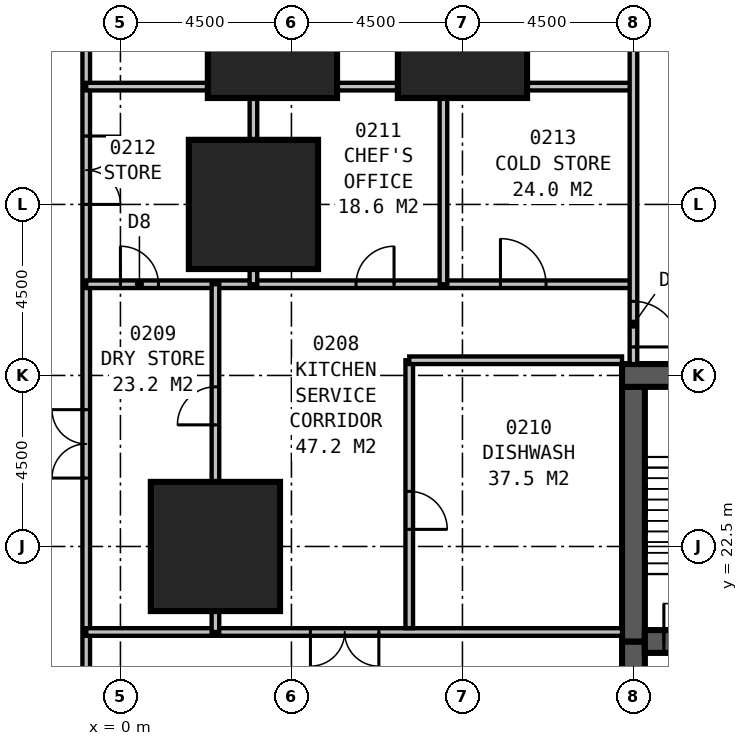
"""IFC4 building model, lengths in metres.
Left out: names, types, materials, properties, quantities, classifications, styles, units other than length and angle.
Written with IfcOpenShell. Run it as: python <this file> out.ifc"""

import sys

from ifc_helpers import new_model, si_unit, direction, frame, frame_2d, origin, origin_2d, place, context, subcontext, project, spatial, rectangle, extrude, element, fill, save


model = new_model("IFC4")
c1 = context("Model", 3, precision=1e-05, world=origin(), true_north=direction((0.0, 1.0)))
c2 = subcontext(c1, "Body", "Model", "MODEL_VIEW")
j1 = project(units=[si_unit("LENGTHUNIT", "METRE"), si_unit("PLANEANGLEUNIT", "RADIAN")], contexts=[c1])
p1 = place(None, origin())
s1 = spatial("IfcSite", under=j1, at=p1, CompositionType="ELEMENT")
p2 = place(p1, origin())
s2 = spatial("IfcBuilding", under=s1, at=p2, CompositionType="ELEMENT")
p3 = place(p2, frame((0.0, 0.0, 11.0)))
s3 = spatial("IfcBuildingStorey", under=s2, at=p3, CompositionType="ELEMENT", Elevation=11.0)
for number, where, z_axis, x_axis in (
    (1, (9.0, 36.0, 0.0), (0.0, 0.0, 1.0), (1.0, 0.0, 0.0)),
    (2, (4.0, 36.0, 0.0), (0.0, 0.0, 1.0), (1.0, 0.0, 0.0)),
    (3, (3.5, 31.5, 0.0), (0.0, 0.0, 1.0), (1.0, 0.0, 0.0)),
    (4, (2.5, 22.5, 0.0), (0.0, 0.0, 1.0), (1.0, 0.0, 0.0)),
):
    element("IfcColumn", number, at=place(p3, frame(where, z_axis=z_axis, x_axis=x_axis)), inside=s3, PredefinedType="COLUMN", context=c2, shape_type="SweptSolid", body=[
        extrude(rectangle(XDim=3.4, YDim=3.4, at=origin_2d()), origin(), (0.0, 0.0, 1.0), 8.0),
    ])
p4 = place(p3, frame((36.3, 27.0, 0.0), z_axis=(0.0, 0.0, 1.0), x_axis=(-1.0, 0.0, 0.0)))
e5 = element("IfcWall", 5, at=p4, inside=s3, PredefinedType="SHEAR", context=c2, shape_type="SweptSolid", body=[
    extrude(rectangle(XDim=23.1, YDim=0.6, at=frame_2d((11.55, 0.0))), origin(), (0.0, 0.0, 1.0), 8.0),
])
p5 = place(p4, frame((17.05, 0.0, 0.0)))
e6 = element("IfcOpeningElement", 6, at=p5, cuts=e5, PredefinedType="OPENING", context=c2, shape_type="SweptSolid", body=[
    extrude(rectangle(XDim=1.0, YDim=2.1, at=frame_2d((0.5, 1.05))), frame((0.0, 0.31, 0.0), z_axis=(0.0, -1.0, 0.0), x_axis=(1.0, 0.0, 0.0)), (0.0, 0.0, 1.0), 0.62),
])
p6 = place(p4, frame((12.05, 0.0, 0.0)))
e7 = element("IfcOpeningElement", 7, at=p6, cuts=e5, PredefinedType="OPENING", context=c2, shape_type="SweptSolid", body=[
    extrude(rectangle(XDim=1.0, YDim=2.1, at=frame_2d((0.5, 1.05))), frame((0.0, 0.31, 0.0), z_axis=(0.0, -1.0, 0.0), x_axis=(1.0, 0.0, 0.0)), (0.0, 0.0, 1.0), 0.62),
])
p7 = place(p4, frame((7.05, 0.0, 0.0)))
e8 = element("IfcOpeningElement", 8, at=p7, cuts=e5, PredefinedType="OPENING", context=c2, shape_type="SweptSolid", body=[
    extrude(rectangle(XDim=1.0, YDim=2.1, at=frame_2d((0.5, 1.05))), frame((0.0, 0.31, 0.0), z_axis=(0.0, -1.0, 0.0), x_axis=(1.0, 0.0, 0.0)), (0.0, 0.0, 1.0), 0.62),
])
p8 = place(p3, frame((13.8, 20.0, 0.0), z_axis=(0.0, 0.0, 1.0), x_axis=(1.0, 0.0, 0.0)))
e9 = element("IfcWall", 9, at=p8, inside=s3, PredefinedType="SHEAR", context=c2, shape_type="SweptSolid", body=[
    extrude(rectangle(XDim=21.9, YDim=0.6, at=frame_2d((10.95, 0.0))), origin(), (0.0, 0.0, 1.0), 8.0),
])
p9 = place(p8, frame((0.5, 0.0, 0.0)))
e10 = element("IfcOpeningElement", 10, at=p9, cuts=e9, PredefinedType="OPENING", context=c2, shape_type="SweptSolid", body=[
    extrude(rectangle(XDim=1.0, YDim=2.1, at=frame_2d((0.5, 1.05))), frame((0.0, 0.31, 0.0), z_axis=(0.0, -1.0, 0.0), x_axis=(1.0, 0.0, 0.0)), (0.0, 0.0, 1.0), 0.62),
])
p10 = place(p8, frame((20.5, 0.0, 0.0)))
e11 = element("IfcOpeningElement", 11, at=p10, cuts=e9, PredefinedType="OPENING", context=c2, shape_type="SweptSolid", body=[
    extrude(rectangle(XDim=1.0, YDim=2.1, at=frame_2d((0.5, 1.05))), frame((0.0, 0.31, 0.0), z_axis=(0.0, -1.0, 0.0), x_axis=(1.0, 0.0, 0.0)), (0.0, 0.0, 1.0), 0.62),
])
p11 = place(p8, frame((16.65, 0.0, 0.0)))
e12 = element("IfcOpeningElement", 12, at=p11, cuts=e9, PredefinedType="OPENING", context=c2, shape_type="SweptSolid", body=[
    extrude(rectangle(XDim=1.1, YDim=2.1, at=frame_2d((0.55, 1.05))), frame((0.0, 0.31, 0.0), z_axis=(0.0, -1.0, 0.0), x_axis=(1.0, 0.0, 0.0)), (0.0, 0.0, 1.0), 0.62),
])
p12 = place(p3, frame((13.5, 26.7, 0.0), z_axis=(0.0, 0.0, 1.0), x_axis=(0.0, -1.0, 0.0)))
e13 = element("IfcWall", 13, at=p12, inside=s3, PredefinedType="SHEAR", context=c2, shape_type="SweptSolid", body=[
    extrude(rectangle(XDim=6.7, YDim=0.6, at=frame_2d((3.35, 0.0))), origin(), (0.0, 0.0, 1.0), 8.0),
])
p13 = place(p3, frame((13.5, 20.0, 0.0), z_axis=(0.0, 0.0, 1.0), x_axis=(0.0, -1.0, 0.0)))
e14 = element("IfcWall", 14, at=p13, inside=s3, PredefinedType="SHEAR", context=c2, shape_type="SweptSolid", body=[
    extrude(rectangle(XDim=3.5, YDim=0.6, at=frame_2d((1.75, 0.0))), origin(), (0.0, 0.0, 1.0), 8.0),
])
p14 = place(p13, frame((1.65, 0.0, 0.0)))
e15 = element("IfcOpeningElement", 15, at=p14, cuts=e14, PredefinedType="OPENING", context=c2, shape_type="SweptSolid", body=[
    extrude(rectangle(XDim=1.2, YDim=2.1, at=frame_2d((0.6, 1.05))), frame((0.0, 0.31, 0.0), z_axis=(0.0, -1.0, 0.0), x_axis=(1.0, 0.0, 0.0)), (0.0, 0.0, 1.0), 0.62),
])
p15 = place(p3, frame((-0.9, -4.5, 0.0), z_axis=(0.0, 0.0, 1.0), x_axis=(0.0, 1.0, 0.0)))
e16 = element("IfcWall", 16, at=p15, inside=s3, PredefinedType="PARTITIONING", context=c2, shape_type="SweptSolid", body=[
    extrude(rectangle(XDim=45.0, YDim=0.2, at=frame_2d((22.5, 0.0))), origin(), (0.0, 0.0, 1.0), 7.7),
])
p16 = place(p15, frame((7.2, 0.0, 0.0), z_axis=(0.0, 0.0, 1.0), x_axis=(-1.0, 0.0, 0.0)))
e17 = element("IfcOpeningElement", 17, at=p16, cuts=e16, PredefinedType="OPENING", context=c2, shape_type="SweptSolid", body=[
    extrude(rectangle(XDim=1.8, YDim=2.4, at=frame_2d((0.9, 1.2))), frame((0.0, 0.11, 0.0), z_axis=(0.0, -1.0, 0.0), x_axis=(1.0, 0.0, 0.0)), (0.0, 0.0, 1.0), 0.22),
])
p17 = place(p15, frame((21.6, 0.0, 0.0), z_axis=(0.0, 0.0, 1.0), x_axis=(-1.0, 0.0, 0.0)))
e18 = element("IfcOpeningElement", 18, at=p17, cuts=e16, PredefinedType="OPENING", context=c2, shape_type="SweptSolid", body=[
    extrude(rectangle(XDim=1.8, YDim=2.4, at=frame_2d((0.9, 1.2))), frame((0.0, 0.11, 0.0), z_axis=(0.0, -1.0, 0.0), x_axis=(1.0, 0.0, 0.0)), (0.0, 0.0, 1.0), 0.22),
])
p18 = place(p15, frame((28.8, 0.0, 0.0)))
e19 = element("IfcOpeningElement", 19, at=p18, cuts=e16, PredefinedType="OPENING", context=c2, shape_type="SweptSolid", body=[
    extrude(rectangle(XDim=1.8, YDim=2.4, at=frame_2d((0.9, 1.2))), frame((0.0, 0.11, 0.0), z_axis=(0.0, -1.0, 0.0), x_axis=(1.0, 0.0, 0.0)), (0.0, 0.0, 1.0), 0.22),
])
p19 = place(p15, frame((37.8, 0.0, 0.0), z_axis=(0.0, 0.0, 1.0), x_axis=(-1.0, 0.0, 0.0)))
e20 = element("IfcOpeningElement", 20, at=p19, cuts=e16, PredefinedType="OPENING", context=c2, shape_type="SweptSolid", body=[
    extrude(rectangle(XDim=1.8, YDim=2.4, at=frame_2d((0.9, 1.2))), frame((0.0, 0.11, 0.0), z_axis=(0.0, -1.0, 0.0), x_axis=(1.0, 0.0, 0.0)), (0.0, 0.0, 1.0), 0.22),
])
p20 = place(p3, frame((-0.9, 20.25, 0.0), z_axis=(0.0, 0.0, 1.0), x_axis=(1.0, 0.0, 0.0)))
e21 = element("IfcWall", 21, at=p20, inside=s3, PredefinedType="PARTITIONING", context=c2, shape_type="SweptSolid", body=[
    extrude(rectangle(XDim=14.1, YDim=0.2, at=frame_2d((7.05, 0.0))), origin(), (0.0, 0.0, 1.0), 7.7),
])
p21 = place(p20, frame((7.7, 0.0, 0.0), z_axis=(0.0, 0.0, 1.0), x_axis=(-1.0, 0.0, 0.0)))
e22 = element("IfcOpeningElement", 22, at=p21, cuts=e21, PredefinedType="OPENING", context=c2, shape_type="SweptSolid", body=[
    extrude(rectangle(XDim=1.8, YDim=2.4, at=frame_2d((0.9, 1.2))), frame((0.0, 0.11, 0.0), z_axis=(0.0, -1.0, 0.0), x_axis=(1.0, 0.0, 0.0)), (0.0, 0.0, 1.0), 0.22),
])
p22 = place(p3, frame((2.5, 20.25, 0.0), z_axis=(0.0, 0.0, 1.0), x_axis=(0.0, 1.0, 0.0)))
e23 = element("IfcWall", 23, at=p22, inside=s3, PredefinedType="PARTITIONING", context=c2, shape_type="SweptSolid", body=[
    extrude(rectangle(XDim=0.55, YDim=0.2, at=frame_2d((0.275, 0.0))), origin(), (0.0, 0.0, 1.0), 6.5),
])
p23 = place(p3, frame((2.5, 24.2, 0.0), z_axis=(0.0, 0.0, 1.0), x_axis=(0.0, 1.0, 0.0)))
e24 = element("IfcWall", 24, at=p23, inside=s3, PredefinedType="PARTITIONING", context=c2, shape_type="SweptSolid", body=[
    extrude(rectangle(XDim=5.2, YDim=0.2, at=frame_2d((2.6, 0.0))), origin(), (0.0, 0.0, 1.0), 6.5),
])
p24 = place(p23, frame((1.5, 0.0, 0.0)))
e25 = element("IfcOpeningElement", 25, at=p24, cuts=e24, PredefinedType="OPENING", context=c2, shape_type="SweptSolid", body=[
    extrude(rectangle(XDim=1.0, YDim=2.1, at=frame_2d((0.5, 1.05))), frame((0.0, 0.11, 0.0), z_axis=(0.0, -1.0, 0.0), x_axis=(1.0, 0.0, 0.0)), (0.0, 0.0, 1.0), 0.22),
])
p25 = place(p3, frame((7.6, 20.35, 0.0), z_axis=(0.0, 0.0, 1.0), x_axis=(0.0, 1.0, 0.0)))
e26 = element("IfcWall", 26, at=p25, inside=s3, PredefinedType="PARTITIONING", context=c2, shape_type="SweptSolid", body=[
    extrude(rectangle(XDim=7.05, YDim=0.2, at=frame_2d((3.525, 0.0))), origin(), (0.0, 0.0, 1.0), 7.7),
])
p26 = place(p25, frame((3.6, 0.0, 0.0), z_axis=(0.0, 0.0, 1.0), x_axis=(-1.0, 0.0, 0.0)))
e27 = element("IfcOpeningElement", 27, at=p26, cuts=e26, PredefinedType="OPENING", context=c2, shape_type="SweptSolid", body=[
    extrude(rectangle(XDim=1.0, YDim=2.1, at=frame_2d((0.5, 1.05))), frame((0.0, 0.11, 0.0), z_axis=(0.0, -1.0, 0.0), x_axis=(1.0, 0.0, 0.0)), (0.0, 0.0, 1.0), 0.22),
])
p27 = place(p3, frame((7.6, 27.4, 0.0), z_axis=(0.0, 0.0, 1.0), x_axis=(1.0, 0.0, 0.0)))
e28 = element("IfcWall", 28, at=p27, inside=s3, PredefinedType="PARTITIONING", context=c2, shape_type="SweptSolid", body=[
    extrude(rectangle(XDim=5.6, YDim=0.2, at=frame_2d((2.8, 0.0))), origin(), (0.0, 0.0, 1.0), 6.4),
])
p28 = place(p3, frame((-0.9, 29.4, 0.0), z_axis=(0.0, 0.0, 1.0), x_axis=(1.0, 0.0, 0.0)))
e29 = element("IfcWall", 29, at=p28, inside=s3, PredefinedType="PARTITIONING", context=c2, shape_type="SweptSolid", body=[
    extrude(rectangle(XDim=14.4, YDim=0.2, at=frame_2d((7.2, 0.0))), origin(), (0.0, 0.0, 1.0), 7.7),
])
p29 = place(p28, frame((7.1, 0.0, 0.0)))
e30 = element("IfcOpeningElement", 30, at=p29, cuts=e29, PredefinedType="OPENING", context=c2, shape_type="SweptSolid", body=[
    extrude(rectangle(XDim=1.0, YDim=2.1, at=frame_2d((0.5, 1.05))), frame((0.0, 0.11, 0.0), z_axis=(0.0, -1.0, 0.0), x_axis=(1.0, 0.0, 0.0)), (0.0, 0.0, 1.0), 0.22),
])
p30 = place(p28, frame((0.9, 0.0, 0.0)))
e31 = element("IfcOpeningElement", 31, at=p30, cuts=e29, PredefinedType="OPENING", context=c2, shape_type="SweptSolid", body=[
    extrude(rectangle(XDim=1.0, YDim=2.1, at=frame_2d((0.5, 1.05))), frame((0.0, 0.11, 0.0), z_axis=(0.0, -1.0, 0.0), x_axis=(1.0, 0.0, 0.0)), (0.0, 0.0, 1.0), 0.22),
])
p31 = place(p28, frame((10.9, 0.0, 0.0)))
e32 = element("IfcOpeningElement", 32, at=p31, cuts=e29, PredefinedType="OPENING", context=c2, shape_type="SweptSolid", body=[
    extrude(rectangle(XDim=1.2, YDim=2.1, at=frame_2d((0.6, 1.05))), frame((0.0, 0.11, 0.0), z_axis=(0.0, -1.0, 0.0), x_axis=(1.0, 0.0, 0.0)), (0.0, 0.0, 1.0), 0.22),
])
p32 = place(p3, frame((8.5, 29.4, 0.0), z_axis=(0.0, 0.0, 1.0), x_axis=(0.0, 1.0, 0.0)))
e33 = element("IfcWall", 33, at=p32, inside=s3, PredefinedType="PARTITIONING", context=c2, shape_type="SweptSolid", body=[
    extrude(rectangle(XDim=5.2, YDim=0.2, at=frame_2d((2.6, 0.0))), origin(), (0.0, 0.0, 1.0), 7.7),
])
p33 = place(p3, frame((3.5, 29.4, 0.0), z_axis=(0.0, 0.0, 1.0), x_axis=(0.0, 1.0, 0.0)))
e34 = element("IfcWall", 34, at=p33, inside=s3, PredefinedType="PARTITIONING", context=c2, shape_type="SweptSolid", body=[
    extrude(rectangle(XDim=0.4, YDim=0.2, at=frame_2d((0.2, 0.0))), origin(), (0.0, 0.0, 1.0), 7.7),
])
p34 = place(p3, frame((3.5, 33.2, 0.0), z_axis=(0.0, 0.0, 1.0), x_axis=(0.0, 1.0, 0.0)))
e35 = element("IfcWall", 35, at=p34, inside=s3, PredefinedType="PARTITIONING", context=c2, shape_type="SweptSolid", body=[
    extrude(rectangle(XDim=1.4, YDim=0.2, at=frame_2d((0.7, 0.0))), origin(), (0.0, 0.0, 1.0), 6.5),
])
p35 = place(p3, frame((-0.9, 34.6, 0.0), z_axis=(0.0, 0.0, 1.0), x_axis=(1.0, 0.0, 0.0)))
e36 = element("IfcWall", 36, at=p35, inside=s3, PredefinedType="PARTITIONING", context=c2, shape_type="SweptSolid", body=[
    extrude(rectangle(XDim=14.4, YDim=0.2, at=frame_2d((7.2, 0.0))), origin(), (0.0, 0.0, 1.0), 7.7),
])
p36 = place(p3, frame((13.5, 27.3, 0.0), z_axis=(0.0, 0.0, 1.0), x_axis=(0.0, 1.0, 0.0)))
e37 = element("IfcWall", 37, at=p36, inside=s3, PredefinedType="PARTITIONING", context=c2, shape_type="SweptSolid", body=[
    extrude(rectangle(XDim=11.8, YDim=0.2, at=frame_2d((5.9, 0.0))), origin(), (0.0, 0.0, 1.0), 6.7),
])
p37 = place(p36, frame((1.65, 0.0, 0.0), z_axis=(0.0, 0.0, 1.0), x_axis=(-1.0, 0.0, 0.0)))
e38 = element("IfcOpeningElement", 38, at=p37, cuts=e37, PredefinedType="OPENING", context=c2, shape_type="SweptSolid", body=[
    extrude(rectangle(XDim=1.2, YDim=2.1, at=frame_2d((0.6, 1.05))), frame((0.0, 0.11, 0.0), z_axis=(0.0, -1.0, 0.0), x_axis=(1.0, 0.0, 0.0)), (0.0, 0.0, 1.0), 0.22),
])
p38 = place(p36, frame((10.2, 0.0, 0.0)))
e39 = element("IfcOpeningElement", 39, at=p38, cuts=e37, PredefinedType="OPENING", context=c2, shape_type="SweptSolid", body=[
    extrude(rectangle(XDim=1.0, YDim=2.1, at=frame_2d((0.5, 1.05))), frame((0.0, 0.11, 0.0), z_axis=(0.0, -1.0, 0.0), x_axis=(1.0, 0.0, 0.0)), (0.0, 0.0, 1.0), 0.22),
])
p39 = place(p18, origin())
e40 = element("IfcDoor", 40, at=p39, inside=s3, OperationType="DOUBLE_DOOR_SINGLE_SWING", PredefinedType="DOOR", context=c2, shape_type="SweptSolid", body=[
    extrude(rectangle(XDim=1.8, YDim=2.4, at=frame_2d((0.9, 1.2))), frame((0.0, 0.025, 0.0), z_axis=(0.0, -1.0, 0.0), x_axis=(1.0, 0.0, 0.0)), (0.0, 0.0, 1.0), 0.05),
])
fill(e19, e40)
p40 = place(p19, origin())
e41 = element("IfcDoor", 41, at=p40, inside=s3, OperationType="DOUBLE_DOOR_SINGLE_SWING", PredefinedType="DOOR", context=c2, shape_type="SweptSolid", body=[
    extrude(rectangle(XDim=1.8, YDim=2.4, at=frame_2d((0.9, 1.2))), frame((0.0, 0.025, 0.0), z_axis=(0.0, -1.0, 0.0), x_axis=(1.0, 0.0, 0.0)), (0.0, 0.0, 1.0), 0.05),
])
fill(e20, e41)
p41 = place(p21, origin())
e42 = element("IfcDoor", 42, at=p41, inside=s3, OperationType="DOUBLE_DOOR_SINGLE_SWING", PredefinedType="DOOR", context=c2, shape_type="SweptSolid", body=[
    extrude(rectangle(XDim=1.8, YDim=2.4, at=frame_2d((0.9, 1.2))), frame((0.0, 0.025, 0.0), z_axis=(0.0, -1.0, 0.0), x_axis=(1.0, 0.0, 0.0)), (0.0, 0.0, 1.0), 0.05),
])
fill(e22, e42)
p42 = place(p24, origin())
e43 = element("IfcDoor", 43, at=p42, inside=s3, OperationType="SINGLE_SWING_LEFT", PredefinedType="DOOR", context=c2, shape_type="SweptSolid", body=[
    extrude(rectangle(XDim=1.0, YDim=2.1, at=frame_2d((0.5, 1.05))), frame((0.0, 0.025, 0.0), z_axis=(0.0, -1.0, 0.0), x_axis=(1.0, 0.0, 0.0)), (0.0, 0.0, 1.0), 0.05),
])
fill(e25, e43)
p43 = place(p26, origin())
e44 = element("IfcDoor", 44, at=p43, inside=s3, OperationType="SINGLE_SWING_RIGHT", PredefinedType="DOOR", context=c2, shape_type="SweptSolid", body=[
    extrude(rectangle(XDim=1.0, YDim=2.1, at=frame_2d((0.5, 1.05))), frame((0.0, 0.025, 0.0), z_axis=(0.0, -1.0, 0.0), x_axis=(1.0, 0.0, 0.0)), (0.0, 0.0, 1.0), 0.05),
])
fill(e27, e44)
p44 = place(p29, origin())
e45 = element("IfcDoor", 45, at=p44, inside=s3, OperationType="SINGLE_SWING_RIGHT", PredefinedType="DOOR", context=c2, shape_type="SweptSolid", body=[
    extrude(rectangle(XDim=1.0, YDim=2.1, at=frame_2d((0.5, 1.05))), frame((0.0, 0.025, 0.0), z_axis=(0.0, -1.0, 0.0), x_axis=(1.0, 0.0, 0.0)), (0.0, 0.0, 1.0), 0.05),
])
fill(e30, e45)
p45 = place(p30, origin())
e46 = element("IfcDoor", 46, at=p45, inside=s3, OperationType="SINGLE_SWING_LEFT", PredefinedType="DOOR", context=c2, shape_type="SweptSolid", body=[
    extrude(rectangle(XDim=1.0, YDim=2.1, at=frame_2d((0.5, 1.05))), frame((0.0, 0.025, 0.0), z_axis=(0.0, -1.0, 0.0), x_axis=(1.0, 0.0, 0.0)), (0.0, 0.0, 1.0), 0.05),
])
fill(e31, e46)
p46 = place(p31, origin())
e47 = element("IfcDoor", 47, at=p46, inside=s3, OperationType="SINGLE_SWING_LEFT", PredefinedType="DOOR", context=c2, shape_type="SweptSolid", body=[
    extrude(rectangle(XDim=1.2, YDim=2.1, at=frame_2d((0.6, 1.05))), frame((0.0, 0.025, 0.0), z_axis=(0.0, -1.0, 0.0), x_axis=(1.0, 0.0, 0.0)), (0.0, 0.0, 1.0), 0.05),
])
fill(e32, e47)
p47 = place(p37, origin())
e48 = element("IfcDoor", 48, at=p47, inside=s3, OperationType="SINGLE_SWING_RIGHT", PredefinedType="DOOR", context=c2, shape_type="SweptSolid", body=[
    extrude(rectangle(XDim=1.2, YDim=2.1, at=frame_2d((0.6, 1.05))), frame((0.0, 0.025, 0.0), z_axis=(0.0, -1.0, 0.0), x_axis=(1.0, 0.0, 0.0)), (0.0, 0.0, 1.0), 0.05),
])
fill(e38, e48)
p48 = place(p9, origin())
e49 = element("IfcDoor", 49, at=p48, inside=s3, OperationType="SINGLE_SWING_LEFT", PredefinedType="DOOR", context=c2, shape_type="SweptSolid", body=[
    extrude(rectangle(XDim=1.0, YDim=2.1, at=frame_2d((0.5, 1.05))), frame((0.0, 0.3, 0.0), z_axis=(0.0, -1.0, 0.0), x_axis=(1.0, 0.0, 0.0)), (0.0, 0.0, 1.0), 0.6),
])
fill(e10, e49)
save(model, sys.argv[1])
